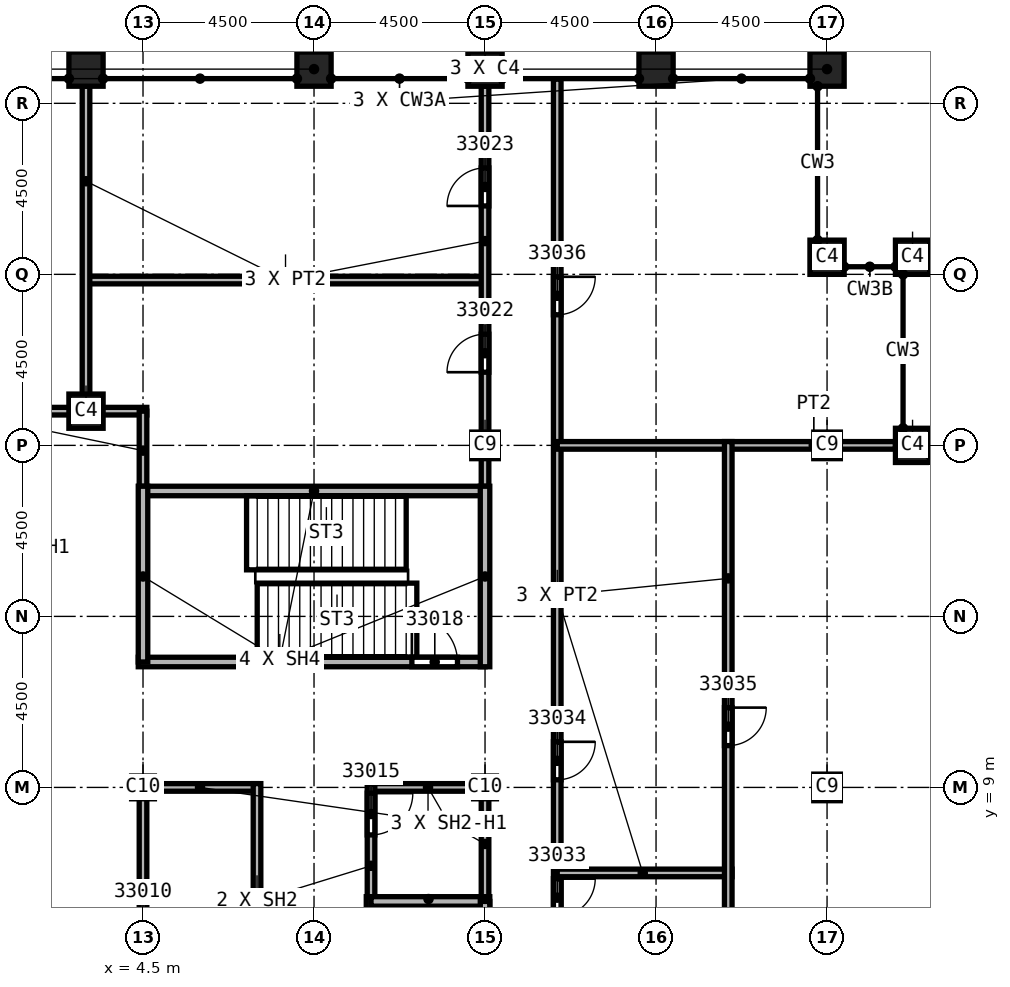
"""IFC4 building model, lengths in metres.
Left out: names, types, materials, properties, quantities, classifications, styles, units other than length and angle.
Written with IfcOpenShell. Run it as: python <this file> out.ifc"""

import sys

from ifc_helpers import new_model, si_unit, direction, frame, frame_2d, origin, origin_2d, place, context, subcontext, project, spatial, rectangle, extrude, element, fill, save


model = new_model("IFC4")
c1 = context("Model", 3, precision=1e-05, world=origin(), true_north=direction((0.0, 1.0)))
c2 = subcontext(c1, "Body", "Model", "MODEL_VIEW")
j1 = project(units=[si_unit("LENGTHUNIT", "METRE"), si_unit("PLANEANGLEUNIT", "RADIAN")], contexts=[c1])
p1 = place(None, origin())
s1 = spatial("IfcSite", under=j1, at=p1, CompositionType="ELEMENT")
p2 = place(p1, origin())
s2 = spatial("IfcBuilding", under=s1, at=p2, CompositionType="ELEMENT")
p3 = place(p2, frame((0.0, 0.0, 361.0)))
s3 = spatial("IfcBuildingStorey", under=s2, at=p3, CompositionType="ELEMENT", Elevation=361.0)
for number, where, z_axis, x_axis in (
    (1, (13.5, 18.0, 0.0), (0.0, 0.0, 1.0), (1.0, 0.0, 0.0)),
    (2, (22.5, 9.0, 0.0), (0.0, 0.0, 1.0), (1.0, 0.0, 0.0)),
    (3, (22.5, 18.0, 0.0), (0.0, 0.0, 1.0), (1.0, 0.0, 0.0)),
):
    element("IfcColumn", number, at=place(p3, frame(where, z_axis=z_axis, x_axis=x_axis)), inside=s3, PredefinedType="COLUMN", context=c2, shape_type="SweptSolid", body=[
        extrude(rectangle(XDim=0.7, YDim=0.7, at=origin_2d()), origin(), (0.0, 0.0, 1.0), 4.6),
    ])
for number, where, z_axis, x_axis in (
    (4, (4.5, 9.0, 0.0), (0.0, 0.0, 1.0), (1.0, 0.0, 0.0)),
    (5, (13.5, 9.0, 0.0), (0.0, 0.0, 1.0), (1.0, 0.0, 0.0)),
):
    element("IfcColumn", number, at=place(p3, frame(where, z_axis=z_axis, x_axis=x_axis)), inside=s3, PredefinedType="COLUMN", context=c2, shape_type="SweptSolid", body=[
        extrude(rectangle(XDim=0.6, YDim=0.6, at=origin_2d()), origin(), (0.0, 0.0, 1.0), 4.6),
    ])
for number, where, z_axis, x_axis in (
    (6, (3.0, 27.9, 0.0), (0.0, 0.0, 1.0), (1.0, 0.0, 0.0)),
    (7, (9.0, 27.9, 0.0), (0.0, 0.0, 1.0), (1.0, 0.0, 0.0)),
    (8, (13.5, 27.9, 0.0), (0.0, 0.0, 1.0), (1.0, 0.0, 0.0)),
    (9, (18.0, 27.9, 0.0), (0.0, 0.0, 1.0), (1.0, 0.0, 0.0)),
    (10, (22.5, 27.9, 0.0), (0.0, 0.0, 1.0), (1.0, 0.0, 0.0)),
    (11, (3.0, 18.9, 0.0), (0.0, 0.0, 1.0), (1.0, 0.0, 0.0)),
    (12, (22.5, 22.95, 0.0), (0.0, 0.0, 1.0), (1.0, 0.0, 0.0)),
    (13, (24.75, 22.95, 0.0), (0.0, 0.0, 1.0), (1.0, 0.0, 0.0)),
    (14, (24.75, 18.0, 0.0), (0.0, 0.0, 1.0), (1.0, 0.0, 0.0)),
):
    element("IfcColumn", number, at=place(p3, frame(where, z_axis=z_axis, x_axis=x_axis)), inside=s3, PredefinedType="COLUMN", context=c2, shape_type="SweptSolid", body=[
        extrude(rectangle(XDim=0.9, YDim=0.9, at=origin_2d()), origin(), (0.0, 0.0, 1.0), 4.6),
    ])
p4 = place(p3, frame((-4.5, 18.9, 0.0), z_axis=(0.0, 0.0, 1.0), x_axis=(1.0, 0.0, 0.0)))
e15 = element("IfcWall", 15, at=p4, inside=s3, PredefinedType="PARTITIONING", context=c2, shape_type="SweptSolid", body=[
    extrude(rectangle(XDim=9.1, YDim=0.2, at=frame_2d((4.55, 0.0))), origin(), (0.0, 0.0, 1.0), 4.15),
])
p5 = place(p3, frame((3.0, 22.35, 0.0), z_axis=(0.0, 0.0, 1.0), x_axis=(1.0, 0.0, 0.0)))
e16 = element("IfcWall", 16, at=p5, inside=s3, PredefinedType="PARTITIONING", context=c2, shape_type="SweptSolid", body=[
    extrude(rectangle(XDim=10.5, YDim=0.2, at=frame_2d((5.25, 0.0))), origin(), (0.0, 0.0, 1.0), 4.15),
])
p6 = place(p3, frame((3.0, 27.45, 0.0), z_axis=(0.0, 0.0, 1.0), x_axis=(0.0, -1.0, 0.0)))
e17 = element("IfcWall", 17, at=p6, inside=s3, PredefinedType="PARTITIONING", context=c2, shape_type="SweptSolid", body=[
    extrude(rectangle(XDim=8.55, YDim=0.2, at=frame_2d((4.275, 0.0))), origin(), (0.0, 0.0, 1.0), 4.15),
])
p7 = place(p3, frame((4.5, 18.9, 0.0), z_axis=(0.0, 0.0, 1.0), x_axis=(0.0, -1.0, 0.0)))
e18 = element("IfcWall", 18, at=p7, inside=s3, PredefinedType="PARTITIONING", context=c2, shape_type="SweptSolid", body=[
    extrude(rectangle(XDim=2.1, YDim=0.2, at=frame_2d((1.05, 0.0))), origin(), (0.0, 0.0, 1.0), 4.15),
])
p8 = place(p3, frame((13.5, 16.675, 0.0), z_axis=(0.0, 0.0, 1.0), x_axis=(0.0, 1.0, 0.0)))
e19 = element("IfcWall", 19, at=p8, inside=s3, PredefinedType="PARTITIONING", context=c2, shape_type="SweptSolid", body=[
    extrude(rectangle(XDim=10.775, YDim=0.2, at=frame_2d((5.387, 0.0))), origin(), (0.0, 0.0, 1.0), 4.15),
])
p9 = place(p8, frame((3.25, 0.0, 0.0)))
e20 = element("IfcOpeningElement", 20, at=p9, cuts=e19, PredefinedType="OPENING", context=c2, shape_type="SweptSolid", body=[
    extrude(rectangle(XDim=1.0, YDim=2.1, at=frame_2d((0.5, 1.05))), frame((0.0, 0.1, 0.0), z_axis=(0.0, -1.0, 0.0), x_axis=(1.0, 0.0, 0.0)), (0.0, 0.0, 1.0), 0.2),
])
p10 = place(p8, frame((7.625, 0.0, 0.0)))
e21 = element("IfcOpeningElement", 21, at=p10, cuts=e19, PredefinedType="OPENING", context=c2, shape_type="SweptSolid", body=[
    extrude(rectangle(XDim=1.0, YDim=2.1, at=frame_2d((0.5, 1.05))), frame((0.0, 0.1, 0.0), z_axis=(0.0, -1.0, 0.0), x_axis=(1.0, 0.0, 0.0)), (0.0, 0.0, 1.0), 0.2),
])
p11 = place(p3, frame((15.4, 27.636, 0.0), z_axis=(0.0, 0.0, 1.0), x_axis=(0.0, -1.0, 0.0)))
e22 = element("IfcWall", 22, at=p11, inside=s3, PredefinedType="PARTITIONING", context=c2, shape_type="SweptSolid", body=[
    extrude(rectangle(XDim=55.272, YDim=0.2, at=frame_2d((27.636, 0.0))), origin(), (0.0, 0.0, 1.0), 4.15),
])
p12 = place(p11, frame((21.036, 0.0, 0.0)))
e23 = element("IfcOpeningElement", 23, at=p12, cuts=e22, PredefinedType="OPENING", context=c2, shape_type="SweptSolid", body=[
    extrude(rectangle(XDim=1.0, YDim=2.1, at=frame_2d((0.5, 1.05))), frame((0.0, 0.1, 0.0), z_axis=(0.0, -1.0, 0.0), x_axis=(1.0, 0.0, 0.0)), (0.0, 0.0, 1.0), 0.2),
])
p13 = place(p11, frame((17.436, 0.0, 0.0)))
e24 = element("IfcOpeningElement", 24, at=p13, cuts=e22, PredefinedType="OPENING", context=c2, shape_type="SweptSolid", body=[
    extrude(rectangle(XDim=1.0, YDim=2.1, at=frame_2d((0.5, 1.05))), frame((0.0, 0.1, 0.0), z_axis=(0.0, -1.0, 0.0), x_axis=(1.0, 0.0, 0.0)), (0.0, 0.0, 1.0), 0.2),
])
p14 = place(p11, frame((5.2, 0.0, 0.0)))
e25 = element("IfcOpeningElement", 25, at=p14, cuts=e22, PredefinedType="OPENING", context=c2, shape_type="SweptSolid", body=[
    extrude(rectangle(XDim=1.0, YDim=2.1, at=frame_2d((0.5, 1.05))), frame((0.0, 0.1, 0.0), z_axis=(0.0, -1.0, 0.0), x_axis=(1.0, 0.0, 0.0)), (0.0, 0.0, 1.0), 0.2),
])
p15 = place(p11, frame((49.836, 0.0, 0.0)))
e26 = element("IfcOpeningElement", 26, at=p15, cuts=e22, PredefinedType="OPENING", context=c2, shape_type="SweptSolid", body=[
    extrude(rectangle(XDim=1.0, YDim=2.1, at=frame_2d((0.5, 1.05))), frame((0.0, 0.1, 0.0), z_axis=(0.0, -1.0, 0.0), x_axis=(1.0, 0.0, 0.0)), (0.0, 0.0, 1.0), 0.2),
])
p16 = place(p11, frame((38.586, 0.0, 0.0)))
e27 = element("IfcOpeningElement", 27, at=p16, cuts=e22, PredefinedType="OPENING", context=c2, shape_type="SweptSolid", body=[
    extrude(rectangle(XDim=1.0, YDim=2.1, at=frame_2d((0.5, 1.05))), frame((0.0, 0.1, 0.0), z_axis=(0.0, -1.0, 0.0), x_axis=(1.0, 0.0, 0.0)), (0.0, 0.0, 1.0), 0.2),
])
p17 = place(p11, frame((31.161, 0.0, 0.0)))
e28 = element("IfcOpeningElement", 28, at=p17, cuts=e22, PredefinedType="OPENING", context=c2, shape_type="SweptSolid", body=[
    extrude(rectangle(XDim=1.0, YDim=2.1, at=frame_2d((0.5, 1.05))), frame((0.0, 0.1, 0.0), z_axis=(0.0, -1.0, 0.0), x_axis=(1.0, 0.0, 0.0)), (0.0, 0.0, 1.0), 0.2),
])
p18 = place(p11, frame((27.786, 0.0, 0.0)))
e29 = element("IfcOpeningElement", 29, at=p18, cuts=e22, PredefinedType="OPENING", context=c2, shape_type="SweptSolid", body=[
    extrude(rectangle(XDim=1.0, YDim=2.1, at=frame_2d((0.5, 1.05))), frame((0.0, 0.1, 0.0), z_axis=(0.0, -1.0, 0.0), x_axis=(1.0, 0.0, 0.0)), (0.0, 0.0, 1.0), 0.2),
])
p19 = place(p3, frame((15.4, 6.75, 0.0), z_axis=(0.0, 0.0, 1.0), x_axis=(1.0, 0.0, 0.0)))
e30 = element("IfcWall", 30, at=p19, inside=s3, PredefinedType="PARTITIONING", context=c2, shape_type="SweptSolid", body=[
    extrude(rectangle(XDim=4.6, YDim=0.2, at=frame_2d((2.3, 0.0))), origin(), (0.0, 0.0, 1.0), 4.15),
])
p20 = place(p3, frame((15.4, 18.0, 0.0), z_axis=(0.0, 0.0, 1.0), x_axis=(1.0, 0.0, 0.0)))
e31 = element("IfcWall", 31, at=p20, inside=s3, PredefinedType="PARTITIONING", context=c2, shape_type="SweptSolid", body=[
    extrude(rectangle(XDim=8.9, YDim=0.2, at=frame_2d((4.45, 0.0))), origin(), (0.0, 0.0, 1.0), 4.15),
])
p21 = place(p3, frame((19.9, 18.1, 0.0), z_axis=(0.0, 0.0, 1.0), x_axis=(0.0, -1.0, 0.0)))
e32 = element("IfcWall", 32, at=p21, inside=s3, PredefinedType="PARTITIONING", context=c2, shape_type="SweptSolid", body=[
    extrude(rectangle(XDim=18.2, YDim=0.2, at=frame_2d((9.1, 0.0))), origin(), (0.0, 0.0, 1.0), 4.15),
])
p22 = place(p21, frame((7.0, 0.0, 0.0)))
e33 = element("IfcOpeningElement", 33, at=p22, cuts=e32, PredefinedType="OPENING", context=c2, shape_type="SweptSolid", body=[
    extrude(rectangle(XDim=1.0, YDim=2.1, at=frame_2d((0.5, 1.05))), frame((0.0, 0.1, 0.0), z_axis=(0.0, -1.0, 0.0), x_axis=(1.0, 0.0, 0.0)), (0.0, 0.0, 1.0), 0.2),
])
p23 = place(p3, frame((4.5, -9.1, 0.0), z_axis=(0.0, 0.0, 1.0), x_axis=(0.0, 1.0, 0.0)))
e34 = element("IfcWall", 34, at=p23, inside=s3, PredefinedType="SOLIDWALL", context=c2, shape_type="SweptSolid", body=[
    extrude(rectangle(XDim=18.2, YDim=0.2, at=frame_2d((9.1, 0.0))), origin(), (0.0, 0.0, 1.0), 3.838),
])
p24 = place(p23, frame((5.5, 0.0, 0.0)))
e35 = element("IfcOpeningElement", 35, at=p24, cuts=e34, PredefinedType="OPENING", context=c2, shape_type="SweptSolid", body=[
    extrude(rectangle(XDim=1.1, YDim=2.1, at=frame_2d((0.55, 1.05))), frame((0.0, 0.1, 0.0), z_axis=(0.0, -1.0, 0.0), x_axis=(1.0, 0.0, 0.0)), (0.0, 0.0, 1.0), 0.2),
])
p25 = place(p23, frame((13.7, 0.0, 0.0)))
e36 = element("IfcOpeningElement", 36, at=p25, cuts=e34, PredefinedType="OPENING", context=c2, shape_type="SweptSolid", body=[
    extrude(rectangle(XDim=1.1, YDim=2.1, at=frame_2d((0.55, 1.05))), frame((0.0, 0.1, 0.0), z_axis=(0.0, -1.0, 0.0), x_axis=(1.0, 0.0, 0.0)), (0.0, 0.0, 1.0), 0.2),
])
p26 = place(p3, frame((4.5, 9.0, 0.0), z_axis=(0.0, 0.0, 1.0), x_axis=(1.0, 0.0, 0.0)))
e37 = element("IfcWall", 37, at=p26, inside=s3, PredefinedType="SOLIDWALL", context=c2, shape_type="SweptSolid", body=[
    extrude(rectangle(XDim=3.0, YDim=0.2, at=frame_2d((1.5, 0.0))), origin(), (0.0, 0.0, 1.0), 3.838),
])
p27 = place(p3, frame((7.5, 9.1, 0.0), z_axis=(0.0, 0.0, 1.0), x_axis=(0.0, -1.0, 0.0)))
e38 = element("IfcWall", 38, at=p27, inside=s3, PredefinedType="SOLIDWALL", context=c2, shape_type="SweptSolid", body=[
    extrude(rectangle(XDim=6.225, YDim=0.2, at=frame_2d((3.113, 0.0))), origin(), (0.0, 0.0, 1.0), 4.15),
])
p28 = place(p3, frame((10.5, 9.0, 0.0), z_axis=(0.0, 0.0, 1.0), x_axis=(1.0, 0.0, 0.0)))
e39 = element("IfcWall", 39, at=p28, inside=s3, PredefinedType="SOLIDWALL", context=c2, shape_type="SweptSolid", body=[
    extrude(rectangle(XDim=3.0, YDim=0.2, at=frame_2d((1.5, 0.0))), origin(), (0.0, 0.0, 1.0), 3.838),
])
p29 = place(p3, frame((10.5, 9.1, 0.0), z_axis=(0.0, 0.0, 1.0), x_axis=(0.0, -1.0, 0.0)))
e40 = element("IfcWall", 40, at=p29, inside=s3, PredefinedType="SOLIDWALL", context=c2, shape_type="SweptSolid", body=[
    extrude(rectangle(XDim=3.225, YDim=0.2, at=frame_2d((1.613, 0.0))), origin(), (0.0, 0.0, 1.0), 4.15),
])
p30 = place(p29, frame((0.25, 0.0, 0.0)))
e41 = element("IfcOpeningElement", 41, at=p30, cuts=e40, PredefinedType="OPENING", context=c2, shape_type="SweptSolid", body=[
    extrude(rectangle(XDim=1.1, YDim=2.1, at=frame_2d((0.55, 1.05))), frame((0.0, 0.1, 0.0), z_axis=(0.0, -1.0, 0.0), x_axis=(1.0, 0.0, 0.0)), (0.0, 0.0, 1.0), 0.2),
])
p31 = place(p3, frame((13.5, 9.1, 0.0), z_axis=(0.0, 0.0, 1.0), x_axis=(0.0, -1.0, 0.0)))
e42 = element("IfcWall", 42, at=p31, inside=s3, PredefinedType="SOLIDWALL", context=c2, shape_type="SweptSolid", body=[
    extrude(rectangle(XDim=3.1, YDim=0.2, at=frame_2d((1.55, 0.0))), origin(), (0.0, 0.0, 1.0), 3.838),
])
p32 = place(p3, frame((10.5, 6.125, 0.0), z_axis=(0.0, 0.0, 1.0), x_axis=(0.0, -1.0, 0.0)))
e43 = element("IfcWall", 43, at=p32, inside=s3, PredefinedType="SOLIDWALL", context=c2, shape_type="SweptSolid", body=[
    extrude(rectangle(XDim=9.25, YDim=0.25, at=frame_2d((4.625, 0.0))), origin(), (0.0, 0.0, 1.0), 4.15),
])
p33 = place(p32, frame((7.075, 0.0, 0.0)))
e44 = element("IfcOpeningElement", 44, at=p33, cuts=e43, PredefinedType="OPENING", context=c2, shape_type="SweptSolid", body=[
    extrude(rectangle(XDim=1.1, YDim=2.1, at=frame_2d((0.55, 1.05))), frame((0.0, 0.125, 0.0), z_axis=(0.0, -1.0, 0.0), x_axis=(1.0, 0.0, 0.0)), (0.0, 0.0, 1.0), 0.25),
])
p34 = place(p32, frame((4.075, 0.0, 0.0)))
e45 = element("IfcOpeningElement", 45, at=p34, cuts=e43, PredefinedType="OPENING", context=c2, shape_type="SweptSolid", body=[
    extrude(rectangle(XDim=1.1, YDim=2.1, at=frame_2d((0.55, 1.05))), frame((0.0, 0.125, 0.0), z_axis=(0.0, -1.0, 0.0), x_axis=(1.0, 0.0, 0.0)), (0.0, 0.0, 1.0), 0.25),
])
p35 = place(p3, frame((10.5, 6.0, 0.0), z_axis=(0.0, 0.0, 1.0), x_axis=(1.0, 0.0, 0.0)))
e46 = element("IfcWall", 46, at=p35, inside=s3, PredefinedType="SOLIDWALL", context=c2, shape_type="SweptSolid", body=[
    extrude(rectangle(XDim=3.125, YDim=0.25, at=frame_2d((1.562, 0.0))), origin(), (0.0, 0.0, 1.0), 4.15),
])
p36 = place(p3, frame((13.5, 6.0, 0.0), z_axis=(0.0, 0.0, 1.0), x_axis=(0.0, -1.0, 0.0)))
e47 = element("IfcWall", 47, at=p36, inside=s3, PredefinedType="SOLIDWALL", context=c2, shape_type="SweptSolid", body=[
    extrude(rectangle(XDim=9.0, YDim=0.25, at=frame_2d((4.5, 0.0))), origin(), (0.0, 0.0, 1.0), 3.838),
])
p37 = place(p3, frame((4.375, 12.3, 0.0), z_axis=(0.0, 0.0, 1.0), x_axis=(1.0, 0.0, 0.0)))
e48 = element("IfcWall", 48, at=p37, inside=s3, PredefinedType="SOLIDWALL", context=c2, shape_type="SweptSolid", body=[
    extrude(rectangle(XDim=9.125, YDim=0.25, at=frame_2d((4.562, 0.0))), origin(), (0.0, 0.0, 1.0), 4.15),
])
p38 = place(p37, frame((7.2, 0.0, 0.0)))
e49 = element("IfcOpeningElement", 49, at=p38, cuts=e48, PredefinedType="OPENING", context=c2, shape_type="SweptSolid", body=[
    extrude(rectangle(XDim=1.2, YDim=2.1, at=frame_2d((0.6, 1.05))), frame((0.0, 0.125, 0.0), z_axis=(0.0, -1.0, 0.0), x_axis=(1.0, 0.0, 0.0)), (0.0, 0.0, 1.0), 0.25),
])
p39 = place(p3, frame((4.4, 16.8, 0.0), z_axis=(0.0, 0.0, 1.0), x_axis=(1.0, 0.0, 0.0)))
e50 = element("IfcWall", 50, at=p39, inside=s3, PredefinedType="SOLIDWALL", context=c2, shape_type="SweptSolid", body=[
    extrude(rectangle(XDim=9.1, YDim=0.25, at=frame_2d((4.55, 0.0))), origin(), (0.0, 0.0, 1.0), 4.15),
])
p40 = place(p3, frame((4.5, 12.3, 0.0), z_axis=(0.0, 0.0, 1.0), x_axis=(0.0, 1.0, 0.0)))
e51 = element("IfcWall", 51, at=p40, inside=s3, PredefinedType="SOLIDWALL", context=c2, shape_type="SweptSolid", body=[
    extrude(rectangle(XDim=4.625, YDim=0.25, at=frame_2d((2.312, 0.0))), origin(), (0.0, 0.0, 1.0), 4.15),
])
p41 = place(p3, frame((13.5, 12.175, 0.0), z_axis=(0.0, 0.0, 1.0), x_axis=(0.0, 1.0, 0.0)))
e52 = element("IfcWall", 52, at=p41, inside=s3, PredefinedType="SOLIDWALL", context=c2, shape_type="SweptSolid", body=[
    extrude(rectangle(XDim=4.75, YDim=0.25, at=frame_2d((2.375, 0.0))), origin(), (0.0, 0.0, 1.0), 4.15),
])
p42 = place(p30, origin())
e53 = element("IfcDoor", 53, at=p42, inside=s3, OperationType="SINGLE_SWING_RIGHT", PredefinedType="DOOR", context=c2, shape_type="SweptSolid", body=[
    extrude(rectangle(XDim=1.1, YDim=2.1, at=frame_2d((0.55, 1.05))), frame((0.0, 0.025, 0.0), z_axis=(0.0, -1.0, 0.0), x_axis=(1.0, 0.0, 0.0)), (0.0, 0.0, 1.0), 0.05),
])
fill(e41, e53)
p43 = place(p38, origin())
e54 = element("IfcDoor", 54, at=p43, inside=s3, OperationType="SINGLE_SWING_LEFT", PredefinedType="DOOR", context=c2, shape_type="SweptSolid", body=[
    extrude(rectangle(XDim=1.2, YDim=2.1, at=frame_2d((0.6, 1.05))), frame((0.0, 0.025, 0.0), z_axis=(0.0, -1.0, 0.0), x_axis=(1.0, 0.0, 0.0)), (0.0, 0.0, 1.0), 0.05),
])
fill(e49, e54)
p44 = place(p9, origin())
e55 = element("IfcDoor", 55, at=p44, inside=s3, OperationType="SINGLE_SWING_LEFT", PredefinedType="DOOR", context=c2, shape_type="SweptSolid", body=[
    extrude(rectangle(XDim=1.0, YDim=2.1, at=frame_2d((0.5, 1.05))), frame((0.0, 0.025, 0.0), z_axis=(0.0, -1.0, 0.0), x_axis=(1.0, 0.0, 0.0)), (0.0, 0.0, 1.0), 0.05),
])
fill(e20, e55)
p45 = place(p10, origin())
e56 = element("IfcDoor", 56, at=p45, inside=s3, OperationType="SINGLE_SWING_RIGHT", PredefinedType="DOOR", context=c2, shape_type="SweptSolid", body=[
    extrude(rectangle(XDim=1.0, YDim=2.1, at=frame_2d((0.5, 1.05))), frame((0.0, 0.025, 0.0), z_axis=(0.0, -1.0, 0.0), x_axis=(1.0, 0.0, 0.0)), (0.0, 0.0, 1.0), 0.05),
])
fill(e21, e56)
p46 = place(p12, origin())
e57 = element("IfcDoor", 57, at=p46, inside=s3, OperationType="SINGLE_SWING_RIGHT", PredefinedType="DOOR", context=c2, shape_type="SweptSolid", body=[
    extrude(rectangle(XDim=1.0, YDim=2.1, at=frame_2d((0.5, 1.05))), frame((0.0, 0.025, 0.0), z_axis=(0.0, -1.0, 0.0), x_axis=(1.0, 0.0, 0.0)), (0.0, 0.0, 1.0), 0.05),
])
fill(e23, e57)
p47 = place(p13, origin())
e58 = element("IfcDoor", 58, at=p47, inside=s3, OperationType="SINGLE_SWING_LEFT", PredefinedType="DOOR", context=c2, shape_type="SweptSolid", body=[
    extrude(rectangle(XDim=1.0, YDim=2.1, at=frame_2d((0.5, 1.05))), frame((0.0, 0.025, 0.0), z_axis=(0.0, -1.0, 0.0), x_axis=(1.0, 0.0, 0.0)), (0.0, 0.0, 1.0), 0.05),
])
fill(e24, e58)
p48 = place(p22, origin())
e59 = element("IfcDoor", 59, at=p48, inside=s3, OperationType="SINGLE_SWING_RIGHT", PredefinedType="DOOR", context=c2, shape_type="SweptSolid", body=[
    extrude(rectangle(XDim=1.0, YDim=2.1, at=frame_2d((0.5, 1.05))), frame((0.0, 0.025, 0.0), z_axis=(0.0, -1.0, 0.0), x_axis=(1.0, 0.0, 0.0)), (0.0, 0.0, 1.0), 0.05),
])
fill(e33, e59)
p49 = place(p14, origin())
e60 = element("IfcDoor", 60, at=p49, inside=s3, OperationType="SINGLE_SWING_LEFT", PredefinedType="DOOR", context=c2, shape_type="SweptSolid", body=[
    extrude(rectangle(XDim=1.0, YDim=2.1, at=frame_2d((0.5, 1.05))), frame((0.0, 0.025, 0.0), z_axis=(0.0, -1.0, 0.0), x_axis=(1.0, 0.0, 0.0)), (0.0, 0.0, 1.0), 0.05),
])
fill(e25, e60)
save(model, sys.argv[1])
